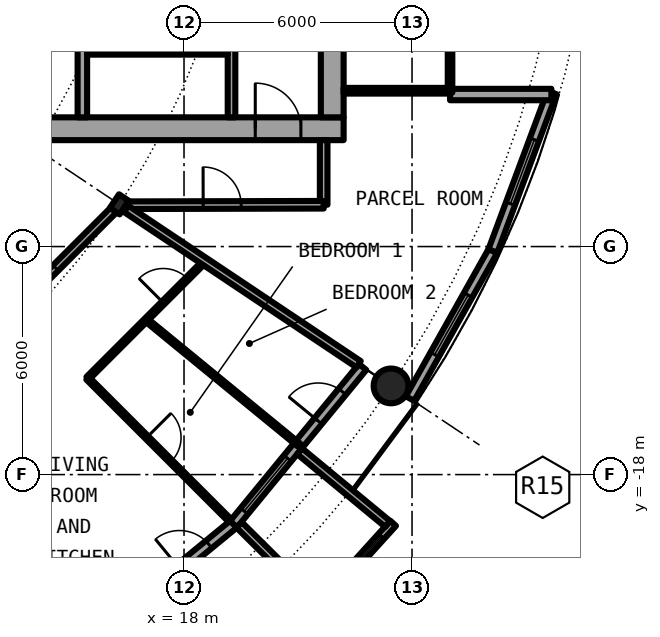
"""IFC4 building model, lengths in metres.
Left out: names, types, materials, properties, quantities, classifications, styles, units other than length and angle.
Written with IfcOpenShell. Run it as: python <this file> out.ifc"""

import sys

from ifc_helpers import new_model, si_unit, direction, frame, frame_2d, origin, origin_2d, place, context, subcontext, project, spatial, rectangle, circle, hollow_circle, i_section, extrude, element, fill, save


model = new_model("IFC4")
c1 = context("Model", 3, precision=1e-05, world=origin(), true_north=direction((0.0, 1.0)))
c2 = subcontext(c1, "Body", "Model", "MODEL_VIEW")
j1 = project(units=[si_unit("LENGTHUNIT", "METRE"), si_unit("PLANEANGLEUNIT", "RADIAN")], contexts=[c1])
p1 = place(None, origin())
s1 = spatial("IfcSite", under=j1, at=p1, CompositionType="ELEMENT")
p2 = place(p1, origin())
s2 = spatial("IfcBuilding", under=s1, at=p2, CompositionType="ELEMENT")
p3 = place(p2, frame((0.0, 0.0, 117.75)))
s3 = spatial("IfcBuildingStorey", under=s2, at=p3, CompositionType="ELEMENT", Elevation=117.75)
p4 = place(p3, frame((23.448, -15.667, 0.0), z_axis=(0.0, 0.0, 1.0), x_axis=(1.0, 0.0, 0.0)))
e1 = element("IfcColumn", 1, at=p4, inside=s3, PredefinedType="COLUMN", context=c2, shape_type="SweptSolid", body=[
    extrude(hollow_circle(Radius=0.457, WallThickness=0.04, at=origin_2d()), origin(), (0.0, 0.0, 1.0), 3.05),
])
p5 = place(p3, frame((16.297, -10.889, 0.0), z_axis=(0.0, 0.0, 1.0), x_axis=(0.831469612303, -0.55557023302, 0.0)))
e2 = element("IfcColumn", 2, at=p5, inside=s3, PredefinedType="COLUMN", context=c2, shape_type="SweptSolid", body=[
    extrude(i_section(OverallWidth=0.307, OverallDepth=0.432, WebThickness=0.021, FlangeThickness=0.04, FilletRadius=0.027, at=origin_2d()), origin(), (0.0, 0.0, 1.0), 3.05),
])
p6 = place(p3, frame((15.167, -22.699, 0.0), z_axis=(0.0, 0.0, 1.0), x_axis=(0.773019449054, 0.634382322723, 0.0)))
e3 = element("IfcWall", 3, at=p6, inside=s3, PredefinedType="SOLIDWALL", context=c2, shape_type="SweptSolid", body=[
    extrude(rectangle(XDim=5.352, YDim=0.25, at=frame_2d((2.676, 0.0))), origin(), (0.0, 0.0, 1.0), 2.7),
])
p7 = place(p6, frame((0.441, 0.0, 0.3)))
e4 = element("IfcOpeningElement", 4, at=p7, cuts=e3, PredefinedType="OPENING", context=c2, shape_type="SweptSolid", body=[
    extrude(rectangle(XDim=1.8, YDim=2.1, at=frame_2d((0.9, 1.05))), frame((0.0, 0.135, 0.0), z_axis=(0.0, -1.0, 0.0), x_axis=(1.0, 0.0, 0.0)), (0.0, 0.0, 1.0), 0.27),
])
p8 = place(p6, frame((3.51, 0.0, 0.0)))
e5 = element("IfcOpeningElement", 5, at=p8, cuts=e3, PredefinedType="OPENING", context=c2, shape_type="SweptSolid", body=[
    extrude(rectangle(XDim=1.0, YDim=2.2, at=frame_2d((0.5, 1.1))), frame((0.0, 0.135, 0.0), z_axis=(0.0, -1.0, 0.0), x_axis=(1.0, 0.0, 0.0)), (0.0, 0.0, 1.0), 0.27),
])
p9 = place(p3, frame((19.304, -19.304, 0.0), z_axis=(0.0, 0.0, 1.0), x_axis=(0.634382322723, 0.773019449054, 0.0)))
e6 = element("IfcWall", 6, at=p9, inside=s3, PredefinedType="SOLIDWALL", context=c2, shape_type="SweptSolid", body=[
    extrude(rectangle(XDim=5.352, YDim=0.25, at=frame_2d((2.676, 0.0))), origin(), (0.0, 0.0, 1.0), 2.7),
])
p10 = place(p9, frame((0.441, 0.0, 0.3)))
e7 = element("IfcOpeningElement", 7, at=p10, cuts=e6, PredefinedType="OPENING", context=c2, shape_type="SweptSolid", body=[
    extrude(rectangle(XDim=1.8, YDim=2.1, at=frame_2d((0.9, 1.05))), frame((0.0, 0.135, 0.0), z_axis=(0.0, -1.0, 0.0), x_axis=(1.0, 0.0, 0.0)), (0.0, 0.0, 1.0), 0.27),
])
p11 = place(p9, frame((3.51, 0.0, 0.0)))
e8 = element("IfcOpeningElement", 8, at=p11, cuts=e6, PredefinedType="OPENING", context=c2, shape_type="SweptSolid", body=[
    extrude(rectangle(XDim=1.0, YDim=2.2, at=frame_2d((0.5, 1.1))), frame((0.0, 0.135, 0.0), z_axis=(0.0, -1.0, 0.0), x_axis=(1.0, 0.0, 0.0)), (0.0, 0.0, 1.0), 0.27),
])
p12 = place(p3, frame((21.493, -21.5, -0.03), z_axis=(0.0, 0.0, 1.0), x_axis=(0.671506829416, 0.740998365753, 0.0)))
e9 = element("IfcWall", 9, at=p12, inside=s3, PredefinedType="SOLIDWALL", context=c2, shape_type="SweptSolid", body=[
    extrude(rectangle(XDim=2.993, YDim=0.2, at=frame_2d((1.497, 0.0))), origin(), (0.0, 0.0, 1.0), 2.73),
])
p13 = place(p12, frame((0.457, 0.0, 0.33)))
e10 = element("IfcOpeningElement", 10, at=p13, cuts=e9, PredefinedType="OPENING", context=c2, shape_type="SweptSolid", body=[
    extrude(circle(Radius=1.04, at=frame_2d((1.04, 1.04))), frame((0.0, 0.11, 0.0), z_axis=(0.0, -1.0, 0.0), x_axis=(1.0, 0.0, 0.0)), (0.0, 0.0, 1.0), 0.22),
])
p14 = place(p3, frame((19.45, -19.323, -0.03), z_axis=(0.0, 0.0, 1.0), x_axis=(0.709727076896, -0.704476739375, 0.0)))
e11 = element("IfcWall", 11, at=p14, inside=s3, PredefinedType="SOLIDWALL", context=c2, shape_type="SweptSolid", body=[
    extrude(rectangle(XDim=2.883, YDim=0.2, at=frame_2d((1.441, 0.0))), origin(), (0.0, 0.0, 1.0), 2.73),
])
p15 = place(p3, frame((21.041, -17.384, -0.03), z_axis=(0.0, 0.0, 1.0), x_axis=(0.770784861449, -0.63709551667, 0.0)))
e12 = element("IfcWall", 12, at=p15, inside=s3, PredefinedType="SOLIDWALL", context=c2, shape_type="SweptSolid", body=[
    extrude(rectangle(XDim=3.006, YDim=0.2, at=frame_2d((1.503, 0.0))), origin(), (0.0, 0.0, 1.0), 2.73),
])
p16 = place(p3, frame((23.946, -16.0, 0.0), z_axis=(0.0, 0.0, 1.0), x_axis=(0.489696356642, 0.871893042919, 0.0)))
e13 = element("IfcWall", 13, at=p16, inside=s3, PredefinedType="SOLIDWALL", context=c2, shape_type="SweptSolid", body=[
    extrude(rectangle(XDim=4.454, YDim=0.25, at=frame_2d((2.227, 0.0))), origin(), (0.0, 0.0, 1.0), 2.7),
])
p17 = place(p16, frame((1.327, 0.0, 0.3)))
e14 = element("IfcOpeningElement", 14, at=p17, cuts=e13, PredefinedType="OPENING", context=c2, shape_type="SweptSolid", body=[
    extrude(rectangle(XDim=1.8, YDim=2.1, at=frame_2d((0.9, 1.05))), frame((0.0, 0.135, 0.0), z_axis=(0.0, -1.0, 0.0), x_axis=(1.0, 0.0, 0.0)), (0.0, 0.0, 1.0), 0.27),
])
p18 = place(p3, frame((26.127, -12.117, 0.0), z_axis=(0.0, 0.0, 1.0), x_axis=(0.349247811493, 0.937030397675, 0.0)))
e15 = element("IfcWall", 15, at=p18, inside=s3, PredefinedType="SOLIDWALL", context=c2, shape_type="SweptSolid", body=[
    extrude(rectangle(XDim=4.452, YDim=0.25, at=frame_2d((2.226, 0.0))), origin(), (0.0, 0.0, 1.0), 2.7),
])
p19 = place(p18, frame((1.327, 0.0, 0.3)))
e16 = element("IfcOpeningElement", 16, at=p19, cuts=e15, PredefinedType="OPENING", context=c2, shape_type="SweptSolid", body=[
    extrude(rectangle(XDim=1.8, YDim=2.1, at=frame_2d((0.9, 1.05))), frame((0.0, 0.135, 0.0), z_axis=(0.0, -1.0, 0.0), x_axis=(1.0, 0.0, 0.0)), (0.0, 0.0, 1.0), 0.27),
])
p20 = place(p3, frame((25.0, -8.0, 0.0), z_axis=(0.0, 0.0, 1.0), x_axis=(1.0, 0.0, 0.0)))
e17 = element("IfcWall", 17, at=p20, inside=s3, PredefinedType="SOLIDWALL", context=c2, shape_type="SweptSolid", body=[
    extrude(rectangle(XDim=2.667, YDim=0.3, at=frame_2d((1.333, 0.0))), origin(), (0.0, 0.0, 1.0), 2.7),
])
p21 = place(p3, frame((8.4, -8.9, 0.0), z_axis=(0.0, 0.0, 1.0), x_axis=(1.0, 0.0, 0.0)))
e18 = element("IfcWall", 18, at=p21, inside=s3, PredefinedType="SHEAR", context=c2, shape_type="SweptSolid", body=[
    extrude(rectangle(XDim=13.8, YDim=0.6, at=frame_2d((6.9, 0.0))), origin(), (0.0, 0.0, 1.0), 3.05),
])
p22 = place(p21, frame((11.475, 0.0, 0.0)))
e19 = element("IfcOpeningElement", 19, at=p22, cuts=e18, PredefinedType="OPENING", context=c2, shape_type="SweptSolid", body=[
    extrude(rectangle(XDim=1.2, YDim=2.3, at=frame_2d((0.6, 1.15))), frame((0.0, 0.31, 0.0), z_axis=(0.0, -1.0, 0.0), x_axis=(1.0, 0.0, 0.0)), (0.0, 0.0, 1.0), 0.62),
])
p23 = place(p3, frame((21.9, 8.6, 0.0), z_axis=(0.0, 0.0, 1.0), x_axis=(0.0, -1.0, 0.0)))
e20 = element("IfcWall", 20, at=p23, inside=s3, PredefinedType="SHEAR", context=c2, shape_type="SweptSolid", body=[
    extrude(rectangle(XDim=17.2, YDim=0.6, at=frame_2d((8.6, 0.0))), origin(), (0.0, 0.0, 1.0), 3.05),
])
p24 = place(p23, frame((7.7, 0.0, 0.0)))
e21 = element("IfcOpeningElement", 21, at=p24, cuts=e20, PredefinedType="OPENING", context=c2, shape_type="SweptSolid", body=[
    extrude(rectangle(XDim=1.8, YDim=2.3, at=frame_2d((0.9, 1.15))), frame((0.0, 0.31, 0.0), z_axis=(0.0, -1.0, 0.0), x_axis=(1.0, 0.0, 0.0)), (0.0, 0.0, 1.0), 0.62),
])
p25 = place(p3, frame((15.325, -8.6, 0.0), z_axis=(0.0, 0.0, 1.0), x_axis=(0.0, 1.0, 0.0)))
e22 = element("IfcWall", 22, at=p25, inside=s3, PredefinedType="SHEAR", context=c2, shape_type="SweptSolid", body=[
    extrude(rectangle(XDim=3.95, YDim=0.25, at=frame_2d((1.975, 0.0))), origin(), (0.0, 0.0, 1.0), 3.05),
])
p26 = place(p25, frame((2.025, 0.0, 0.0)))
e23 = element("IfcOpeningElement", 23, at=p26, cuts=e22, PredefinedType="OPENING", context=c2, shape_type="SweptSolid", body=[
    extrude(rectangle(XDim=1.2, YDim=2.3, at=frame_2d((0.6, 1.15))), frame((0.0, 0.135, 0.0), z_axis=(0.0, -1.0, 0.0), x_axis=(1.0, 0.0, 0.0)), (0.0, 0.0, 1.0), 0.27),
])
p27 = place(p3, frame((19.25, -8.6, 0.0), z_axis=(0.0, 0.0, 1.0), x_axis=(0.0, 1.0, 0.0)))
e24 = element("IfcWall", 24, at=p27, inside=s3, PredefinedType="SOLIDWALL", context=c2, shape_type="SweptSolid", body=[
    extrude(rectangle(XDim=7.025, YDim=0.2, at=frame_2d((3.513, 0.0))), origin(), (0.0, 0.0, 1.0), 2.7),
])
p28 = place(p27, frame((2.35, 0.0, 0.0)))
e25 = element("IfcOpeningElement", 25, at=p28, cuts=e24, PredefinedType="OPENING", context=c2, shape_type="SweptSolid", body=[
    extrude(rectangle(XDim=1.1, YDim=2.3, at=frame_2d((0.55, 1.15))), frame((0.0, 0.11, 0.0), z_axis=(0.0, -1.0, 0.0), x_axis=(1.0, 0.0, 0.0)), (0.0, 0.0, 1.0), 0.22),
])
p29 = place(p3, frame((15.45, -6.875, 0.0), z_axis=(0.0, 0.0, 1.0), x_axis=(1.0, 0.0, 0.0)))
e26 = element("IfcWall", 26, at=p29, inside=s3, PredefinedType="PARTITIONING", context=c2, shape_type="SweptSolid", body=[
    extrude(rectangle(XDim=3.7, YDim=0.15, at=frame_2d((1.85, 0.0))), origin(), (0.0, 0.0, 1.0), 2.7),
])
p30 = place(p29, frame((1.4, 0.0, 0.0)))
e27 = element("IfcOpeningElement", 27, at=p30, cuts=e26, PredefinedType="OPENING", context=c2, shape_type="SweptSolid", body=[
    extrude(rectangle(XDim=0.9, YDim=2.3, at=frame_2d((0.45, 1.15))), frame((0.0, 0.085, 0.0), z_axis=(0.0, -1.0, 0.0), x_axis=(1.0, 0.0, 0.0)), (0.0, 0.0, 1.0), 0.17),
])
p31 = place(p3, frame((22.2, -7.9, 0.0), z_axis=(0.0, 0.0, 1.0), x_axis=(1.0, 0.0, 0.0)))
e28 = element("IfcWall", 28, at=p31, inside=s3, PredefinedType="PARTITIONING", context=c2, shape_type="SweptSolid", body=[
    extrude(rectangle(XDim=2.74, YDim=0.15, at=frame_2d((1.37, 0.0))), origin(), (0.0, 0.0, 1.0), 2.7),
])
p32 = place(p3, frame((25.0, -7.95, 0.0), z_axis=(0.0, 0.0, 1.0), x_axis=(0.0, 1.0, 0.0)))
e29 = element("IfcWall", 29, at=p32, inside=s3, PredefinedType="PARTITIONING", context=c2, shape_type="SweptSolid", body=[
    extrude(rectangle(XDim=15.9, YDim=0.12, at=frame_2d((7.95, 0.0))), origin(), (0.0, 0.0, 1.0), 2.7),
])
p33 = place(p32, frame((0.95, 0.0, 0.1)))
e30 = element("IfcOpeningElement", 30, at=p33, cuts=e29, PredefinedType="OPENING", context=c2, shape_type="SweptSolid", body=[
    extrude(rectangle(XDim=14.0, YDim=2.35, at=frame_2d((7.0, 1.175))), frame((0.0, 0.07, 0.0), z_axis=(0.0, -1.0, 0.0), x_axis=(1.0, 0.0, 0.0)), (0.0, 0.0, 1.0), 0.14),
])
p34 = place(p3, frame((15.468, -15.463, 0.0), z_axis=(0.0, 0.0, 1.0), x_axis=(0.707106781187, 0.707106781187, 0.0)))
e31 = element("IfcWall", 31, at=p34, inside=s3, PredefinedType="PARTITIONING", context=c2, shape_type="SweptSolid", body=[
    extrude(rectangle(XDim=4.351, YDim=0.1, at=frame_2d((2.176, 0.0))), origin(), (0.0, 0.0, 1.0), 2.7),
])
p35 = place(p34, frame((2.808, 0.0, 0.0)))
e32 = element("IfcOpeningElement", 32, at=p35, cuts=e31, PredefinedType="OPENING", context=c2, shape_type="SweptSolid", body=[
    extrude(rectangle(XDim=0.9, YDim=2.3, at=frame_2d((0.45, 1.15))), frame((0.0, 0.06, 0.0), z_axis=(0.0, -1.0, 0.0), x_axis=(1.0, 0.0, 0.0)), (0.0, 0.0, 1.0), 0.12),
])
p36 = place(p3, frame((21.675, -10.9, 0.0), z_axis=(0.0, 0.0, 1.0), x_axis=(0.0, 1.0, 0.0)))
e33 = element("IfcWall", 33, at=p36, inside=s3, PredefinedType="PARTITIONING", context=c2, shape_type="SweptSolid", body=[
    extrude(rectangle(XDim=1.7, YDim=0.2, at=frame_2d((0.85, 0.0))), origin(), (0.0, 0.0, 1.0), 2.7),
])
p37 = place(p3, frame((11.0, -16.186, 0.0), z_axis=(0.0, 0.0, 1.0), x_axis=(0.707106781187, 0.707106781187, 0.0)))
e34 = element("IfcWall", 34, at=p37, inside=s3, PredefinedType="PARTITIONING", context=c2, shape_type="SweptSolid", body=[
    extrude(rectangle(XDim=7.334, YDim=0.2, at=frame_2d((3.667, 0.0))), origin(), (0.0, 0.0, 1.0), 2.39),
])
p38 = place(p37, frame((4.123, 0.0, 0.0)))
e35 = element("IfcOpeningElement", 35, at=p38, cuts=e34, PredefinedType="OPENING", context=c2, shape_type="SweptSolid", body=[
    extrude(rectangle(XDim=1.0, YDim=2.3, at=frame_2d((0.5, 1.15))), frame((0.0, 0.11, 0.0), z_axis=(0.0, -1.0, 0.0), x_axis=(1.0, 0.0, 0.0)), (0.0, 0.0, 1.0), 0.22),
])
p39 = place(p3, frame((16.541, -10.912, 0.0), z_axis=(0.0, 0.0, 1.0), x_axis=(0.999997173357, 0.002377662213, 0.0)))
e36 = element("IfcWall", 36, at=p39, inside=s3, PredefinedType="PARTITIONING", context=c2, shape_type="SweptSolid", body=[
    extrude(rectangle(XDim=5.134, YDim=0.2, at=frame_2d((2.567, 0.0))), origin(), (0.0, 0.0, 1.0), 2.7),
])
p40 = place(p39, frame((1.963, 0.0, 0.0)))
e37 = element("IfcOpeningElement", 37, at=p40, cuts=e36, PredefinedType="OPENING", context=c2, shape_type="SweptSolid", body=[
    extrude(rectangle(XDim=1.0, YDim=2.3, at=frame_2d((0.5, 1.15))), frame((0.0, 0.11, 0.0), z_axis=(0.0, -1.0, 0.0), x_axis=(1.0, 0.0, 0.0)), (0.0, 0.0, 1.0), 0.22),
])
p41 = place(p3, frame((11.009, -16.477, 0.0), z_axis=(0.0, 0.0, 1.0), x_axis=(0.555664536482, -0.831406593008, 0.0)))
e38 = element("IfcWall", 38, at=p41, inside=s3, PredefinedType="PARTITIONING", context=c2, shape_type="SweptSolid", body=[
    extrude(rectangle(XDim=7.358, YDim=0.2, at=frame_2d((3.679, 0.0))), origin(), (0.0, 0.0, 1.0), 2.7),
])
p42 = place(p3, frame((15.465, -15.465, 0.0), z_axis=(0.0, 0.0, 1.0), x_axis=(0.707106781187, -0.707106781187, 0.0)))
e39 = element("IfcWall", 39, at=p42, inside=s3, PredefinedType="PARTITIONING", context=c2, shape_type="SweptSolid", body=[
    extrude(rectangle(XDim=5.305, YDim=0.1, at=frame_2d((2.652, 0.0))), origin(), (0.0, 0.0, 1.0), 2.7),
])
p43 = place(p42, frame((2.202, 0.0, 0.0)))
e40 = element("IfcOpeningElement", 40, at=p43, cuts=e39, PredefinedType="OPENING", context=c2, shape_type="SweptSolid", body=[
    extrude(rectangle(XDim=0.9, YDim=2.3, at=frame_2d((0.45, 1.15))), frame((0.0, 0.06, 0.0), z_axis=(0.0, -1.0, 0.0), x_axis=(1.0, 0.0, 0.0)), (0.0, 0.0, 1.0), 0.12),
])
p44 = place(p3, frame((16.477, -11.009, 0.0), z_axis=(0.0, 0.0, 1.0), x_axis=(0.831467903109, -0.555572791, 0.0)))
e41 = element("IfcWall", 41, at=p44, inside=s3, PredefinedType="PARTITIONING", context=c2, shape_type="SweptSolid", body=[
    extrude(rectangle(XDim=7.358, YDim=0.2, at=frame_2d((3.679, 0.0))), origin(), (0.0, 0.0, 1.0), 2.7),
])
p45 = place(p3, frame((17.004, -13.927, 0.0), z_axis=(0.0, 0.0, 1.0), x_axis=(0.773517471898, -0.633774976367, 0.0)))
e42 = element("IfcWall", 42, at=p45, inside=s3, PredefinedType="PARTITIONING", context=c2, shape_type="SweptSolid", body=[
    extrude(rectangle(XDim=5.196, YDim=0.1, at=frame_2d((2.598, 0.0))), origin(), (0.0, 0.0, 1.0), 2.7),
])
p46 = place(p8, origin())
e43 = element("IfcDoor", 43, at=p46, inside=s3, OperationType="SINGLE_SWING_LEFT", PredefinedType="DOOR", context=c2, shape_type="SweptSolid", body=[
    extrude(rectangle(XDim=1.0, YDim=2.2, at=frame_2d((0.5, 1.1))), frame((0.0, 0.025, 0.0), z_axis=(0.0, -1.0, 0.0), x_axis=(1.0, 0.0, 0.0)), (0.0, 0.0, 1.0), 0.05),
])
fill(e5, e43)
p47 = place(p10, origin())
e44 = element("IfcWindow", 44, at=p47, inside=s3, PartitioningType="SINGLE_PANEL", PredefinedType="WINDOW", context=c2, shape_type="SweptSolid", body=[
    extrude(rectangle(XDim=1.8, YDim=2.1, at=frame_2d((0.9, 1.05))), frame((0.0, 0.03, 0.0), z_axis=(0.0, -1.0, 0.0), x_axis=(1.0, 0.0, 0.0)), (0.0, 0.0, 1.0), 0.06),
])
fill(e7, e44)
p48 = place(p13, origin())
e45 = element("IfcWindow", 45, at=p48, inside=s3, PartitioningType="SINGLE_PANEL", PredefinedType="WINDOW", context=c2, shape_type="SweptSolid", body=[
    extrude(circle(Radius=1.04, at=frame_2d((1.04, 1.04))), frame((0.0, 0.03, 0.0), z_axis=(0.0, -1.0, 0.0), x_axis=(1.0, 0.0, 0.0)), (0.0, 0.0, 1.0), 0.06),
])
fill(e10, e45)
p49 = place(p11, origin())
e46 = element("IfcDoor", 46, at=p49, inside=s3, OperationType="SINGLE_SWING_LEFT", PredefinedType="DOOR", context=c2, shape_type="SweptSolid", body=[
    extrude(rectangle(XDim=1.0, YDim=2.2, at=frame_2d((0.5, 1.1))), frame((0.0, 0.025, 0.0), z_axis=(0.0, -1.0, 0.0), x_axis=(1.0, 0.0, 0.0)), (0.0, 0.0, 1.0), 0.05),
])
fill(e8, e46)
p50 = place(p17, origin())
e47 = element("IfcWindow", 47, at=p50, inside=s3, PartitioningType="SINGLE_PANEL", PredefinedType="WINDOW", context=c2, shape_type="SweptSolid", body=[
    extrude(rectangle(XDim=1.8, YDim=2.1, at=frame_2d((0.9, 1.05))), frame((0.0, 0.03, 0.0), z_axis=(0.0, -1.0, 0.0), x_axis=(1.0, 0.0, 0.0)), (0.0, 0.0, 1.0), 0.06),
])
fill(e14, e47)
p51 = place(p19, origin())
e48 = element("IfcWindow", 48, at=p51, inside=s3, PartitioningType="SINGLE_PANEL", PredefinedType="WINDOW", context=c2, shape_type="SweptSolid", body=[
    extrude(rectangle(XDim=1.8, YDim=2.1, at=frame_2d((0.9, 1.05))), frame((0.0, 0.03, 0.0), z_axis=(0.0, -1.0, 0.0), x_axis=(1.0, 0.0, 0.0)), (0.0, 0.0, 1.0), 0.06),
])
fill(e16, e48)
p52 = place(p30, origin())
e49 = element("IfcDoor", 49, at=p52, inside=s3, OperationType="SINGLE_SWING_LEFT", PredefinedType="DOOR", context=c2, shape_type="SweptSolid", body=[
    extrude(rectangle(XDim=0.9, YDim=2.3, at=frame_2d((0.45, 1.15))), frame((0.0, 0.025, 0.0), z_axis=(0.0, -1.0, 0.0), x_axis=(1.0, 0.0, 0.0)), (0.0, 0.0, 1.0), 0.05),
])
fill(e27, e49)
p53 = place(p22, origin())
e50 = element("IfcDoor", 50, at=p53, inside=s3, OperationType="SINGLE_SWING_LEFT", PredefinedType="DOOR", context=c2, shape_type="SweptSolid", body=[
    extrude(rectangle(XDim=1.2, YDim=2.3, at=frame_2d((0.6, 1.15))), frame((0.0, 0.025, 0.0), z_axis=(0.0, -1.0, 0.0), x_axis=(1.0, 0.0, 0.0)), (0.0, 0.0, 1.0), 0.05),
])
fill(e19, e50)
p54 = place(p33, origin())
e51 = element("IfcWindow", 51, at=p54, inside=s3, PartitioningType="SINGLE_PANEL", PredefinedType="WINDOW", context=c2, shape_type="SweptSolid", body=[
    extrude(rectangle(XDim=14.0, YDim=2.35, at=frame_2d((7.0, 1.175))), frame((0.0, 0.03, 0.0), z_axis=(0.0, -1.0, 0.0), x_axis=(1.0, 0.0, 0.0)), (0.0, 0.0, 1.0), 0.06),
])
fill(e30, e51)
p55 = place(p38, origin())
e52 = element("IfcDoor", 52, at=p55, inside=s3, OperationType="SINGLE_SWING_RIGHT", PredefinedType="DOOR", context=c2, shape_type="SweptSolid", body=[
    extrude(rectangle(XDim=1.0, YDim=2.3, at=frame_2d((0.5, 1.15))), frame((0.0, 0.025, 0.0), z_axis=(0.0, -1.0, 0.0), x_axis=(1.0, 0.0, 0.0)), (0.0, 0.0, 1.0), 0.05),
])
fill(e35, e52)
p56 = place(p43, origin())
e53 = element("IfcDoor", 53, at=p56, inside=s3, OperationType="SINGLE_SWING_RIGHT", PredefinedType="DOOR", context=c2, shape_type="SweptSolid", body=[
    extrude(rectangle(XDim=0.9, YDim=2.3, at=frame_2d((0.45, 1.15))), frame((0.0, 0.025, 0.0), z_axis=(0.0, -1.0, 0.0), x_axis=(1.0, 0.0, 0.0)), (0.0, 0.0, 1.0), 0.05),
])
fill(e40, e53)
p57 = place(p35, origin())
e54 = element("IfcDoor", 54, at=p57, inside=s3, OperationType="SINGLE_SWING_RIGHT", PredefinedType="DOOR", context=c2, shape_type="SweptSolid", body=[
    extrude(rectangle(XDim=0.9, YDim=2.3, at=frame_2d((0.45, 1.15))), frame((0.0, 0.025, 0.0), z_axis=(0.0, -1.0, 0.0), x_axis=(1.0, 0.0, 0.0)), (0.0, 0.0, 1.0), 0.05),
])
fill(e32, e54)
p58 = place(p40, origin())
e55 = element("IfcDoor", 55, at=p58, inside=s3, OperationType="SINGLE_SWING_LEFT", PredefinedType="DOOR", context=c2, shape_type="SweptSolid", body=[
    extrude(rectangle(XDim=1.0, YDim=2.3, at=frame_2d((0.5, 1.15))), frame((0.0, 0.025, 0.0), z_axis=(0.0, -1.0, 0.0), x_axis=(1.0, 0.0, 0.0)), (0.0, 0.0, 1.0), 0.05),
])
fill(e37, e55)
save(model, sys.argv[1])
